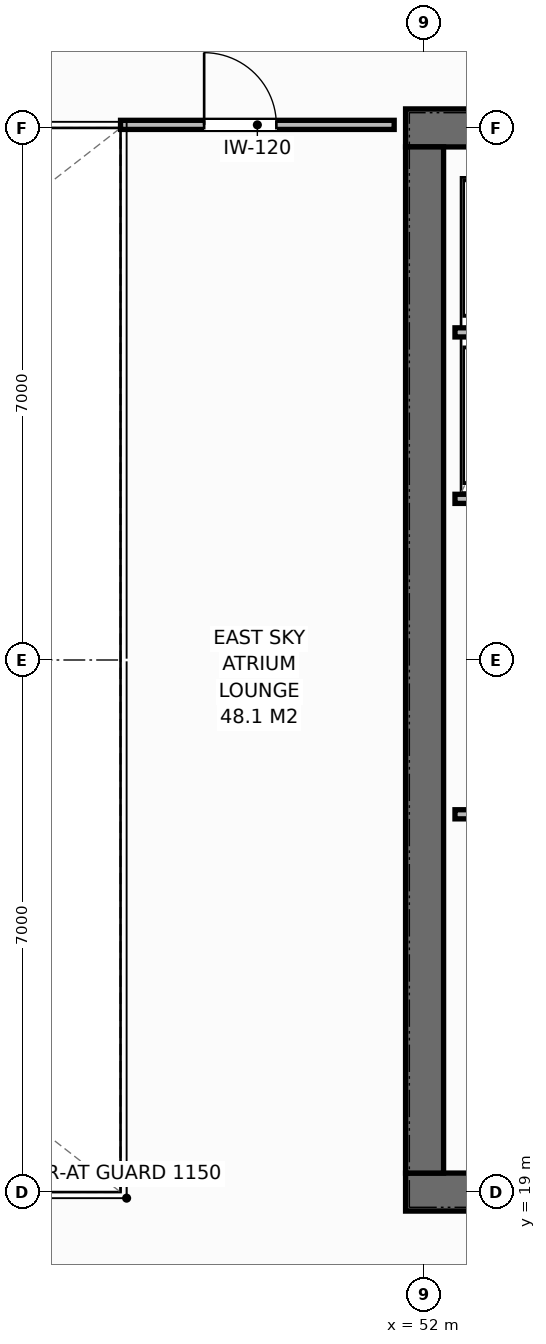
"""IFC4 building model, lengths in metres.
Left out: names, types, materials, properties, quantities, classifications, styles, units other than length and angle.
Written with IfcOpenShell. Run it as: python <this file> out.ifc"""

import sys

from ifc_helpers import new_model, si_unit, direction, frame, frame_2d, origin, place, context, subcontext, project, spatial, rectangle, extrude, element, fill, save


model = new_model("IFC4")
c1 = context("Model", 3, precision=1e-05, world=origin(), true_north=direction((0.0, 1.0)))
c2 = subcontext(c1, "Body", "Model", "MODEL_VIEW")
j1 = project(units=[si_unit("LENGTHUNIT", "METRE"), si_unit("PLANEANGLEUNIT", "RADIAN")], contexts=[c1])
p1 = place(None, origin())
s1 = spatial("IfcSite", under=j1, at=p1, CompositionType="ELEMENT")
p2 = place(p1, origin())
s2 = spatial("IfcBuilding", under=s1, at=p2, CompositionType="ELEMENT")
p3 = place(p2, frame((0.0, 0.0, 274.6)))
s3 = spatial("IfcBuildingStorey", under=s2, at=p3, CompositionType="ELEMENT", Elevation=274.6)
p4 = place(p3, frame((51.75, 19.0, 0.0), z_axis=(0.0, 0.0, 1.0), x_axis=(1.0, 0.0, 0.0)))
e1 = element("IfcWall", 1, at=p4, inside=s3, PredefinedType="SHEAR", context=c2, shape_type="SweptSolid", body=[
    extrude(rectangle(XDim=13.5, YDim=0.5, at=frame_2d((6.75, 0.0))), origin(), (0.0, 0.0, 1.0), 3.8),
])
p5 = place(p4, frame((2.97, 0.0, 0.0)))
e2 = element("IfcOpeningElement", 2, at=p5, cuts=e1, PredefinedType="OPENING", context=c2, shape_type="SweptSolid", body=[
    extrude(rectangle(XDim=1.4, YDim=2.2, at=frame_2d((0.7, 1.1))), frame((0.0, 0.26, 0.0), z_axis=(0.0, -1.0, 0.0), x_axis=(1.0, 0.0, 0.0)), (0.0, 0.0, 1.0), 0.52),
])
p6 = place(p3, frame((51.75, 33.0, 0.0), z_axis=(0.0, 0.0, 1.0), x_axis=(1.0, 0.0, 0.0)))
e3 = element("IfcWall", 3, at=p6, inside=s3, PredefinedType="SHEAR", context=c2, shape_type="SweptSolid", body=[
    extrude(rectangle(XDim=13.5, YDim=0.5, at=frame_2d((6.75, 0.0))), origin(), (0.0, 0.0, 1.0), 3.8),
])
p7 = place(p6, frame((2.97, 0.0, 0.0)))
e4 = element("IfcOpeningElement", 4, at=p7, cuts=e3, PredefinedType="OPENING", context=c2, shape_type="SweptSolid", body=[
    extrude(rectangle(XDim=1.4, YDim=2.2, at=frame_2d((0.7, 1.1))), frame((0.0, 0.26, 0.0), z_axis=(0.0, -1.0, 0.0), x_axis=(1.0, 0.0, 0.0)), (0.0, 0.0, 1.0), 0.52),
])
p8 = place(p6, frame((10.85, 0.0, 0.0)))
e5 = element("IfcOpeningElement", 5, at=p8, cuts=e3, PredefinedType="OPENING", context=c2, shape_type="SweptSolid", body=[
    extrude(rectangle(XDim=0.9, YDim=2.15, at=frame_2d((0.45, 1.075))), frame((0.0, 0.26, 0.0), z_axis=(0.0, -1.0, 0.0), x_axis=(1.0, 0.0, 0.0)), (0.0, 0.0, 1.0), 0.52),
])
p9 = place(p6, frame((5.8, 0.0, 0.0)))
e6 = element("IfcOpeningElement", 6, at=p9, cuts=e3, PredefinedType="OPENING", context=c2, shape_type="SweptSolid", body=[
    extrude(rectangle(XDim=0.9, YDim=2.15, at=frame_2d((0.45, 1.075))), frame((0.0, 0.26, 0.0), z_axis=(0.0, -1.0, 0.0), x_axis=(1.0, 0.0, 0.0)), (0.0, 0.0, 1.0), 0.52),
])
p10 = place(p6, frame((8.2, 0.0, 0.0)))
e7 = element("IfcOpeningElement", 7, at=p10, cuts=e3, PredefinedType="OPENING", context=c2, shape_type="SweptSolid", body=[
    extrude(rectangle(XDim=0.95, YDim=2.15, at=frame_2d((0.475, 1.075))), frame((0.0, 0.26, 0.0), z_axis=(0.0, -1.0, 0.0), x_axis=(1.0, 0.0, 0.0)), (0.0, 0.0, 1.0), 0.52),
])
p11 = place(p3, frame((52.0, 19.25, 0.0), z_axis=(0.0, 0.0, 1.0), x_axis=(0.0, 1.0, 0.0)))
e8 = element("IfcWall", 8, at=p11, inside=s3, PredefinedType="SHEAR", context=c2, shape_type="SweptSolid", body=[
    extrude(rectangle(XDim=13.5, YDim=0.5, at=frame_2d((6.75, 0.0))), origin(), (0.0, 0.0, 1.0), 3.8),
])
for number, where, z_axis, x_axis in (
    (9, (52.4, 23.97, 0.0), (0.0, 0.0, 1.0), (1.0, 0.0, 0.0)),
    (10, (52.4, 28.12, 0.0), (0.0, 0.0, 1.0), (1.0, 0.0, 0.0)),
    (11, (52.4, 30.31, 0.0), (0.0, 0.0, 1.0), (1.0, 0.0, 0.0)),
):
    element("IfcWall", number, at=place(p3, frame(where, z_axis=z_axis, x_axis=x_axis)), inside=s3, PredefinedType="PARTITIONING", context=c2, shape_type="SweptSolid", body=[
        extrude(rectangle(XDim=2.2, YDim=0.12, at=frame_2d((1.1, 0.0))), origin(), (0.0, 0.0, 1.0), 3.588),
    ])
p12 = place(p3, frame((48.0, 33.04, 0.0), z_axis=(0.0, 0.0, 1.0), x_axis=(1.0, 0.0, 0.0)))
e12 = element("IfcWall", 12, at=p12, inside=s3, PredefinedType="PARTITIONING", context=c2, shape_type="SweptSolid", body=[
    extrude(rectangle(XDim=3.6, YDim=0.12, at=frame_2d((1.8, 0.0))), origin(), (0.0, 0.0, 1.0), 3.328),
])
p13 = place(p12, frame((1.1, 0.0, 0.0)))
e13 = element("IfcOpeningElement", 13, at=p13, cuts=e12, PredefinedType="OPENING", context=c2, shape_type="SweptSolid", body=[
    extrude(rectangle(XDim=0.95, YDim=2.15, at=frame_2d((0.475, 1.075))), frame((0.0, 0.07, 0.0), z_axis=(0.0, -1.0, 0.0), x_axis=(1.0, 0.0, 0.0)), (0.0, 0.0, 1.0), 0.14),
])
p14 = place(p13, origin())
e14 = element("IfcDoor", 14, at=p14, inside=s3, OperationType="SINGLE_SWING_LEFT", PredefinedType="DOOR", context=c2, shape_type="SweptSolid", body=[
    extrude(rectangle(XDim=0.95, YDim=2.15, at=frame_2d((0.475, 1.075))), frame((0.0, 0.025, 0.0), z_axis=(0.0, -1.0, 0.0), x_axis=(1.0, 0.0, 0.0)), (0.0, 0.0, 1.0), 0.05),
])
fill(e13, e14)
save(model, sys.argv[1])
